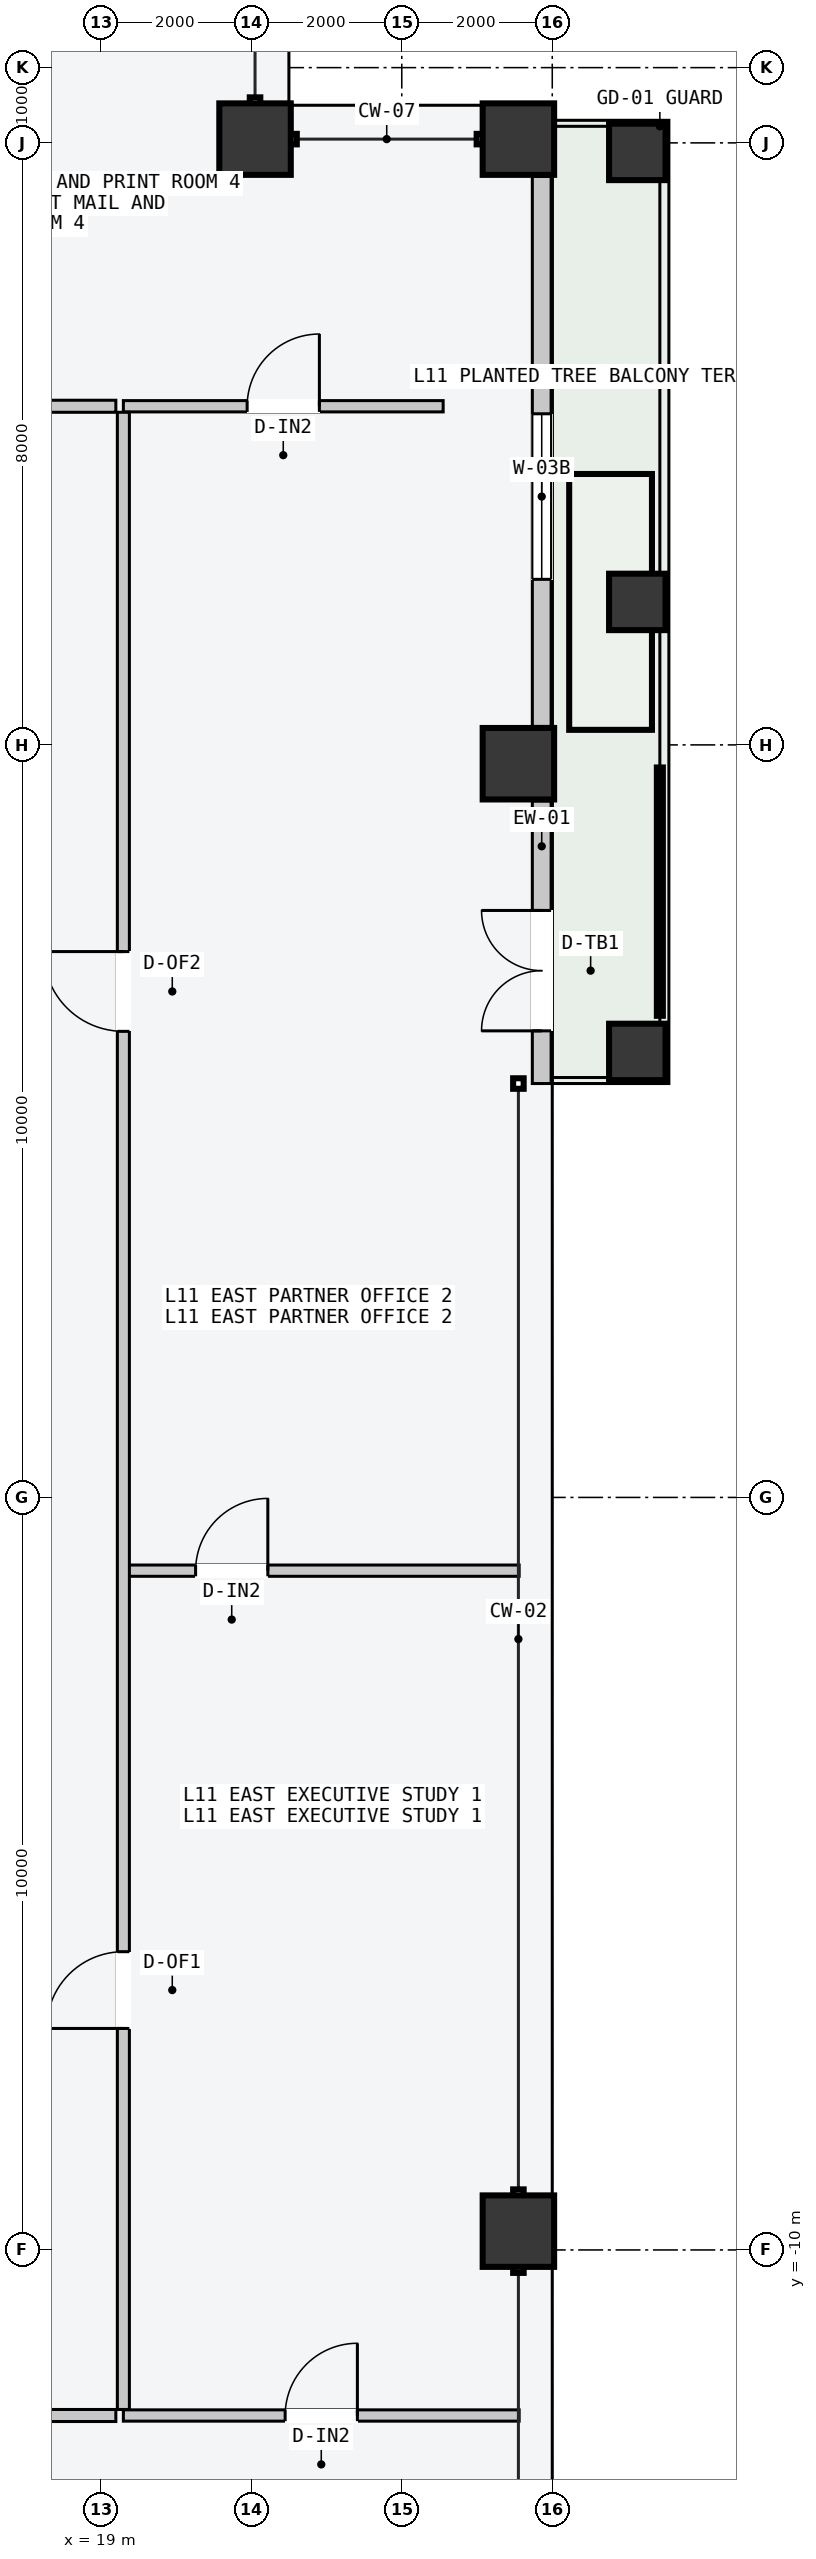
"""IFC4 building model, lengths in metres.
Left out: names, types, materials, properties, quantities, classifications, styles, units other than length and angle.
Written with IfcOpenShell. Run it as: python <this file> out.ifc"""

import sys

from ifc_helpers import new_model, si_unit, direction, frame, frame_2d, origin, origin_2d, place, context, subcontext, project, spatial, rectangle, hollow_rectangle, extrude, element, fill, save


model = new_model("IFC4")
c1 = context("Model", 3, precision=1e-05, world=origin(), true_north=direction((0.0, 1.0)))
c2 = subcontext(c1, "Body", "Model", "MODEL_VIEW")
j1 = project(units=[si_unit("LENGTHUNIT", "METRE"), si_unit("PLANEANGLEUNIT", "RADIAN")], contexts=[c1])
p1 = place(None, origin())
s1 = spatial("IfcSite", under=j1, at=p1, CompositionType="ELEMENT")
p2 = place(p1, origin())
s2 = spatial("IfcBuilding", under=s1, at=p2, CompositionType="ELEMENT")
p3 = place(p2, frame((0.0, 0.0, 45.6)))
s3 = spatial("IfcBuildingStorey", under=s2, at=p3, CompositionType="ELEMENT", Elevation=45.6)
for number, where, z_axis, x_axis in (
    (1, (24.55, -9.75, 0.0), (0.0, 0.0, 1.0), (0.0, 1.0, 0.0)),
    (2, (24.55, 9.75, 0.0), (0.0, 0.0, 1.0), (0.0, 1.0, 0.0)),
    (3, (24.55, 18.05, 0.0), (0.0, 0.0, 1.0), (0.0, 1.0, 0.0)),
    (4, (21.05, 18.05, 0.0), (0.0, 0.0, 1.0), (1.0, 0.0, 0.0)),
):
    element("IfcColumn", number, at=place(p3, frame(where, z_axis=z_axis, x_axis=x_axis)), inside=s3, PredefinedType="COLUMN", context=c2, shape_type="SweptSolid", body=[
        extrude(hollow_rectangle(XDim=0.95, YDim=0.95, WallThickness=0.048, at=origin_2d()), origin(), (0.0, 0.0, 1.0), 3.6),
    ])
for number, where, z_axis, x_axis in (
    (5, (26.13, 5.92, 0.0), (0.0, 0.0, 1.0), (0.0, 1.0, 0.0)),
    (6, (26.13, 17.88, 0.0), (0.0, 0.0, 1.0), (0.0, 1.0, 0.0)),
    (7, (26.13, 11.9, 0.0), (0.0, 0.0, 1.0), (0.0, 1.0, 0.0)),
):
    element("IfcColumn", number, at=place(p3, frame(where, z_axis=z_axis, x_axis=x_axis)), inside=s3, PredefinedType="COLUMN", context=c2, shape_type="SweptSolid", body=[
        extrude(hollow_rectangle(XDim=0.75, YDim=0.75, WallThickness=0.032, at=origin_2d()), origin(), (0.0, 0.0, 1.0), 3.6),
    ])
p4 = place(p3, frame((24.86, 5.5, 0.0), z_axis=(0.0, 0.0, 1.0), x_axis=(0.0, 1.0, 0.0)))
e8 = element("IfcWall", 8, at=p4, inside=s3, PredefinedType="STANDARD", context=c2, shape_type="SweptSolid", body=[
    extrude(rectangle(XDim=3.755, YDim=0.25, at=frame_2d((1.877, 0.0))), origin(), (0.0, 0.0, 1.0), 3.4),
])
p5 = place(p4, frame((0.7, 0.0, 0.0)))
e9 = element("IfcOpeningElement", 9, at=p5, cuts=e8, PredefinedType="OPENING", context=c2, shape_type="SweptSolid", body=[
    extrude(rectangle(XDim=1.6, YDim=2.2, at=frame_2d((0.8, 1.1))), frame((0.0, 0.135, 0.0), z_axis=(0.0, -1.0, 0.0), x_axis=(1.0, 0.0, 0.0)), (0.0, 0.0, 1.0), 0.27),
])
p6 = place(p3, frame((24.86, 10.245, 0.0), z_axis=(0.0, 0.0, 1.0), x_axis=(0.0, 1.0, 0.0)))
e10 = element("IfcWall", 10, at=p6, inside=s3, PredefinedType="STANDARD", context=c2, shape_type="SweptSolid", body=[
    extrude(rectangle(XDim=7.31, YDim=0.25, at=frame_2d((3.655, 0.0))), origin(), (0.0, 0.0, 1.0), 3.4),
])
p7 = place(p6, frame((1.955, 0.0, 0.85)))
e11 = element("IfcOpeningElement", 11, at=p7, cuts=e10, PredefinedType="OPENING", context=c2, shape_type="SweptSolid", body=[
    extrude(rectangle(XDim=2.2, YDim=2.1, at=frame_2d((1.1, 1.05))), frame((0.0, 0.135, 0.0), z_axis=(0.0, -1.0, 0.0), x_axis=(1.0, 0.0, 0.0)), (0.0, 0.0, 1.0), 0.27),
])
p8 = place(p3, frame((-19.2, 14.5, 0.0), z_axis=(0.0, 0.0, 1.0), x_axis=(1.0, 0.0, 0.0)))
e12 = element("IfcWall", 12, at=p8, inside=s3, PredefinedType="PARTITIONING", context=c2, shape_type="SweptSolid", body=[
    extrude(rectangle(XDim=38.4, YDim=0.16, at=frame_2d((19.2, 0.0))), origin(), (0.0, 0.0, 1.0), 3.4),
])
p9 = place(p8, frame((3.545, 0.0, 0.0)))
e13 = element("IfcOpeningElement", 13, at=p9, cuts=e12, PredefinedType="OPENING", context=c2, shape_type="SweptSolid", body=[
    extrude(rectangle(XDim=0.96, YDim=2.18, at=frame_2d((0.48, 1.09))), frame((0.0, 0.09, 0.0), z_axis=(0.0, -1.0, 0.0), x_axis=(1.0, 0.0, 0.0)), (0.0, 0.0, 1.0), 0.18),
])
p10 = place(p8, frame((14.111, 0.0, 0.0)))
e14 = element("IfcOpeningElement", 14, at=p10, cuts=e12, PredefinedType="OPENING", context=c2, shape_type="SweptSolid", body=[
    extrude(rectangle(XDim=1.02, YDim=2.2, at=frame_2d((0.51, 1.1))), frame((0.0, 0.09, 0.0), z_axis=(0.0, -1.0, 0.0), x_axis=(1.0, 0.0, 0.0)), (0.0, 0.0, 1.0), 0.18),
])
p11 = place(p8, frame((24.631, 0.0, 0.0)))
e15 = element("IfcOpeningElement", 15, at=p11, cuts=e12, PredefinedType="OPENING", context=c2, shape_type="SweptSolid", body=[
    extrude(rectangle(XDim=1.06, YDim=2.2, at=frame_2d((0.53, 1.1))), frame((0.0, 0.09, 0.0), z_axis=(0.0, -1.0, 0.0), x_axis=(1.0, 0.0, 0.0)), (0.0, 0.0, 1.0), 0.18),
])
p12 = place(p8, frame((33.145, 0.0, 0.0)))
e16 = element("IfcOpeningElement", 16, at=p12, cuts=e12, PredefinedType="OPENING", context=c2, shape_type="SweptSolid", body=[
    extrude(rectangle(XDim=1.24, YDim=2.24, at=frame_2d((0.62, 1.12))), frame((0.0, 0.09, 0.0), z_axis=(0.0, -1.0, 0.0), x_axis=(1.0, 0.0, 0.0)), (0.0, 0.0, 1.0), 0.18),
])
p13 = place(p3, frame((19.3, 14.5, 0.0), z_axis=(0.0, 0.0, 1.0), x_axis=(1.0, 0.0, 0.0)))
e17 = element("IfcWall", 17, at=p13, inside=s3, PredefinedType="PARTITIONING", context=c2, shape_type="SweptSolid", body=[
    extrude(rectangle(XDim=4.25, YDim=0.15, at=frame_2d((2.125, 0.0))), origin(), (0.0, 0.0, 1.0), 3.4),
])
p14 = place(p13, frame((1.645, 0.0, 0.0)))
e18 = element("IfcOpeningElement", 18, at=p14, cuts=e17, PredefinedType="OPENING", context=c2, shape_type="SweptSolid", body=[
    extrude(rectangle(XDim=0.96, YDim=2.18, at=frame_2d((0.48, 1.09))), frame((0.0, 0.085, 0.0), z_axis=(0.0, -1.0, 0.0), x_axis=(1.0, 0.0, 0.0)), (0.0, 0.0, 1.0), 0.17),
])
p15 = place(p3, frame((-19.2, -12.2, 0.0), z_axis=(0.0, 0.0, 1.0), x_axis=(1.0, 0.0, 0.0)))
e19 = element("IfcWall", 19, at=p15, inside=s3, PredefinedType="PARTITIONING", context=c2, shape_type="SweptSolid", body=[
    extrude(rectangle(XDim=38.4, YDim=0.16, at=frame_2d((19.2, 0.0))), origin(), (0.0, 0.0, 1.0), 3.4),
])
p16 = place(p15, frame((4.215, 0.0, 0.0)))
e20 = element("IfcOpeningElement", 20, at=p16, cuts=e19, PredefinedType="OPENING", context=c2, shape_type="SweptSolid", body=[
    extrude(rectangle(XDim=1.24, YDim=2.24, at=frame_2d((0.62, 1.12))), frame((0.0, 0.09, 0.0), z_axis=(0.0, -1.0, 0.0), x_axis=(1.0, 0.0, 0.0)), (0.0, 0.0, 1.0), 0.18),
])
p17 = place(p15, frame((15.129, 0.0, 0.0)))
e21 = element("IfcOpeningElement", 21, at=p17, cuts=e19, PredefinedType="OPENING", context=c2, shape_type="SweptSolid", body=[
    extrude(rectangle(XDim=1.4, YDim=2.2, at=frame_2d((0.7, 1.1))), frame((0.0, 0.09, 0.0), z_axis=(0.0, -1.0, 0.0), x_axis=(1.0, 0.0, 0.0)), (0.0, 0.0, 1.0), 0.18),
])
p18 = place(p15, frame((29.744, 0.0, 0.0)))
e22 = element("IfcOpeningElement", 22, at=p18, cuts=e19, PredefinedType="OPENING", context=c2, shape_type="SweptSolid", body=[
    extrude(rectangle(XDim=0.9, YDim=2.15, at=frame_2d((0.45, 1.075))), frame((0.0, 0.09, 0.0), z_axis=(0.0, -1.0, 0.0), x_axis=(1.0, 0.0, 0.0)), (0.0, 0.0, 1.0), 0.18),
])
p19 = place(p3, frame((19.3, -12.2, 0.0), z_axis=(0.0, 0.0, 1.0), x_axis=(1.0, 0.0, 0.0)))
e23 = element("IfcWall", 23, at=p19, inside=s3, PredefinedType="PARTITIONING", context=c2, shape_type="SweptSolid", body=[
    extrude(rectangle(XDim=5.26, YDim=0.15, at=frame_2d((2.63, 0.0))), origin(), (0.0, 0.0, 1.0), 3.4),
])
p20 = place(p19, frame((2.15, 0.0, 0.0)))
e24 = element("IfcOpeningElement", 24, at=p20, cuts=e23, PredefinedType="OPENING", context=c2, shape_type="SweptSolid", body=[
    extrude(rectangle(XDim=0.96, YDim=2.18, at=frame_2d((0.48, 1.09))), frame((0.0, 0.085, 0.0), z_axis=(0.0, -1.0, 0.0), x_axis=(1.0, 0.0, 0.0)), (0.0, 0.0, 1.0), 0.17),
])
p21 = place(p3, frame((19.36, -0.973, 0.0), z_axis=(0.0, 0.0, 1.0), x_axis=(1.0, 0.0, 0.0)))
e25 = element("IfcWall", 25, at=p21, inside=s3, PredefinedType="PARTITIONING", context=c2, shape_type="SweptSolid", body=[
    extrude(rectangle(XDim=5.2, YDim=0.15, at=frame_2d((2.6, 0.0))), origin(), (0.0, 0.0, 1.0), 3.4),
])
p22 = place(p21, frame((0.9, 0.0, 0.0)))
e26 = element("IfcOpeningElement", 26, at=p22, cuts=e25, PredefinedType="OPENING", context=c2, shape_type="SweptSolid", body=[
    extrude(rectangle(XDim=0.96, YDim=2.18, at=frame_2d((0.48, 1.09))), frame((0.0, 0.085, 0.0), z_axis=(0.0, -1.0, 0.0), x_axis=(1.0, 0.0, 0.0)), (0.0, 0.0, 1.0), 0.17),
])
p23 = place(p3, frame((19.3, -12.12, 0.0), z_axis=(0.0, 0.0, 1.0), x_axis=(0.0, 1.0, 0.0)))
e27 = element("IfcWall", 27, at=p23, inside=s3, PredefinedType="PARTITIONING", context=c2, shape_type="SweptSolid", body=[
    extrude(rectangle(XDim=26.54, YDim=0.16, at=frame_2d((13.27, 0.0))), origin(), (0.0, 0.0, 1.0), 3.4),
])
p24 = place(p23, frame((5.063, 0.0, 0.0)))
e28 = element("IfcOpeningElement", 28, at=p24, cuts=e27, PredefinedType="OPENING", context=c2, shape_type="SweptSolid", body=[
    extrude(rectangle(XDim=1.02, YDim=2.2, at=frame_2d((0.51, 1.1))), frame((0.0, 0.09, 0.0), z_axis=(0.0, -1.0, 0.0), x_axis=(1.0, 0.0, 0.0)), (0.0, 0.0, 1.0), 0.18),
])
p25 = place(p23, frame((18.313, 0.0, 0.0)))
e29 = element("IfcOpeningElement", 29, at=p25, cuts=e27, PredefinedType="OPENING", context=c2, shape_type="SweptSolid", body=[
    extrude(rectangle(XDim=1.06, YDim=2.2, at=frame_2d((0.53, 1.1))), frame((0.0, 0.09, 0.0), z_axis=(0.0, -1.0, 0.0), x_axis=(1.0, 0.0, 0.0)), (0.0, 0.0, 1.0), 0.18),
])
p26 = place(p5, origin())
e30 = element("IfcDoor", 30, at=p26, inside=s3, OperationType="DOUBLE_DOOR_SINGLE_SWING", PredefinedType="DOOR", context=c2, shape_type="SweptSolid", body=[
    extrude(rectangle(XDim=1.6, YDim=2.2, at=frame_2d((0.8, 1.1))), frame((0.0, 0.025, 0.0), z_axis=(0.0, -1.0, 0.0), x_axis=(1.0, 0.0, 0.0)), (0.0, 0.0, 1.0), 0.05),
])
fill(e9, e30)
p27 = place(p7, origin())
e31 = element("IfcWindow", 31, at=p27, inside=s3, PartitioningType="SINGLE_PANEL", PredefinedType="WINDOW", context=c2, shape_type="SweptSolid", body=[
    extrude(rectangle(XDim=2.2, YDim=2.1, at=frame_2d((1.1, 1.05))), frame((0.0, 0.03, 0.0), z_axis=(0.0, -1.0, 0.0), x_axis=(1.0, 0.0, 0.0)), (0.0, 0.0, 1.0), 0.06),
])
fill(e11, e31)
p28 = place(p14, origin())
e32 = element("IfcDoor", 32, at=p28, inside=s3, OperationType="SINGLE_SWING_RIGHT", PredefinedType="DOOR", context=c2, shape_type="SweptSolid", body=[
    extrude(rectangle(XDim=0.96, YDim=2.18, at=frame_2d((0.48, 1.09))), frame((0.0, 0.025, 0.0), z_axis=(0.0, -1.0, 0.0), x_axis=(1.0, 0.0, 0.0)), (0.0, 0.0, 1.0), 0.05),
])
fill(e18, e32)
p29 = place(p20, origin())
e33 = element("IfcDoor", 33, at=p29, inside=s3, OperationType="SINGLE_SWING_RIGHT", PredefinedType="DOOR", context=c2, shape_type="SweptSolid", body=[
    extrude(rectangle(XDim=0.96, YDim=2.18, at=frame_2d((0.48, 1.09))), frame((0.0, 0.025, 0.0), z_axis=(0.0, -1.0, 0.0), x_axis=(1.0, 0.0, 0.0)), (0.0, 0.0, 1.0), 0.05),
])
fill(e24, e33)
p30 = place(p22, origin())
e34 = element("IfcDoor", 34, at=p30, inside=s3, OperationType="SINGLE_SWING_RIGHT", PredefinedType="DOOR", context=c2, shape_type="SweptSolid", body=[
    extrude(rectangle(XDim=0.96, YDim=2.18, at=frame_2d((0.48, 1.09))), frame((0.0, 0.025, 0.0), z_axis=(0.0, -1.0, 0.0), x_axis=(1.0, 0.0, 0.0)), (0.0, 0.0, 1.0), 0.05),
])
fill(e26, e34)
p31 = place(p24, origin())
e35 = element("IfcDoor", 35, at=p31, inside=s3, OperationType="SINGLE_SWING_LEFT", PredefinedType="DOOR", context=c2, shape_type="SweptSolid", body=[
    extrude(rectangle(XDim=1.02, YDim=2.2, at=frame_2d((0.51, 1.1))), frame((0.0, 0.025, 0.0), z_axis=(0.0, -1.0, 0.0), x_axis=(1.0, 0.0, 0.0)), (0.0, 0.0, 1.0), 0.05),
])
fill(e28, e35)
p32 = place(p25, origin())
e36 = element("IfcDoor", 36, at=p32, inside=s3, OperationType="SINGLE_SWING_RIGHT", PredefinedType="DOOR", context=c2, shape_type="SweptSolid", body=[
    extrude(rectangle(XDim=1.06, YDim=2.2, at=frame_2d((0.53, 1.1))), frame((0.0, 0.025, 0.0), z_axis=(0.0, -1.0, 0.0), x_axis=(1.0, 0.0, 0.0)), (0.0, 0.0, 1.0), 0.05),
])
fill(e29, e36)
save(model, sys.argv[1])
